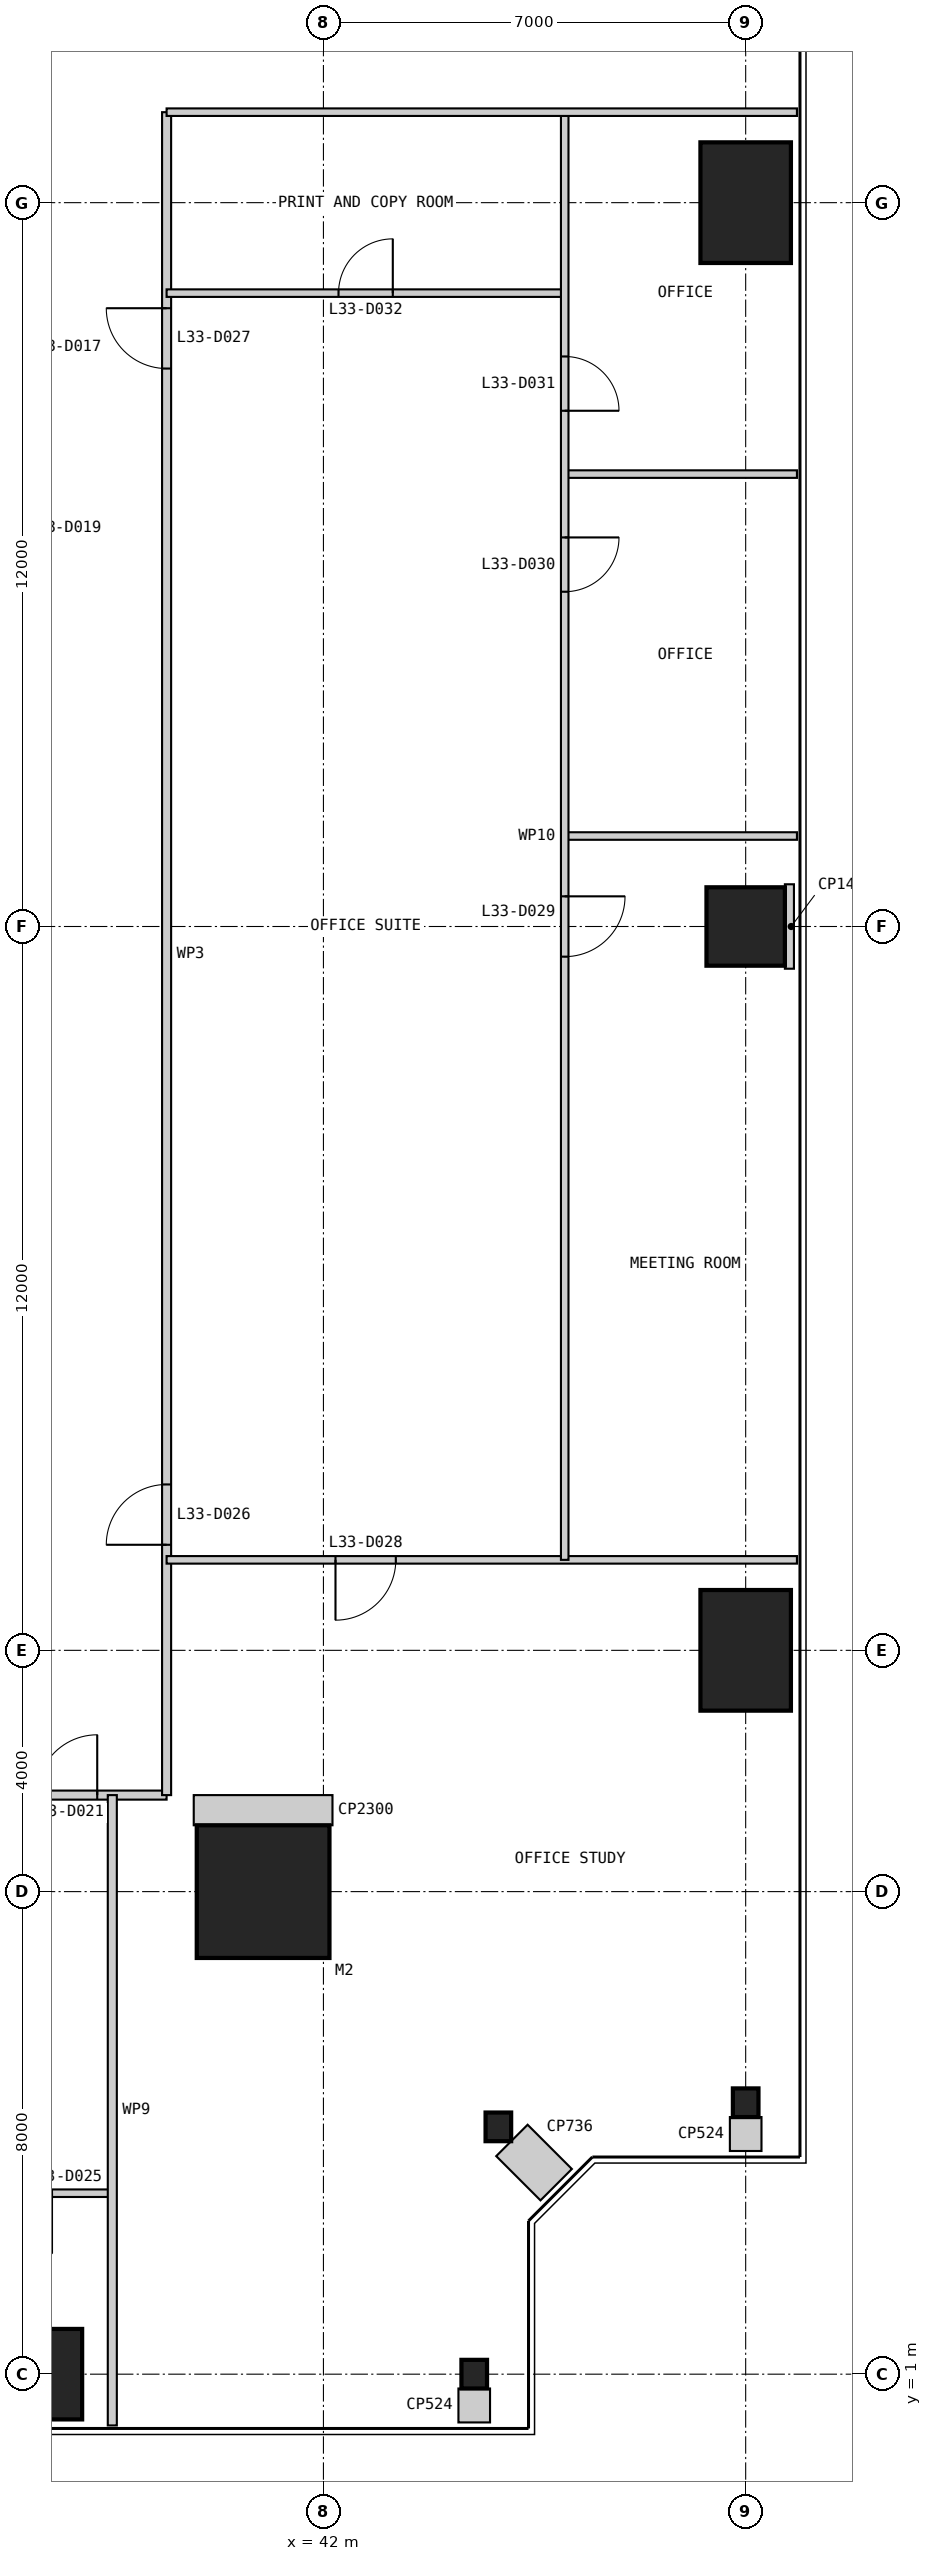
"""IFC4 building model, lengths in metres.
Left out: names, types, materials, properties, quantities, classifications, styles, units other than length and angle.
Written with IfcOpenShell. Run it as: python <this file> out.ifc"""

import sys

from ifc_helpers import new_model, si_unit, direction, frame, frame_2d, origin, origin_2d, place, context, subcontext, project, spatial, rectangle, i_section, extrude, element, fill, save


model = new_model("IFC4")
c1 = context("Model", 3, precision=1e-05, world=origin(), true_north=direction((0.0, 1.0)))
c2 = subcontext(c1, "Body", "Model", "MODEL_VIEW")
j1 = project(units=[si_unit("LENGTHUNIT", "METRE"), si_unit("PLANEANGLEUNIT", "RADIAN")], contexts=[c1])
p1 = place(None, origin())
s1 = spatial("IfcSite", under=j1, at=p1, CompositionType="ELEMENT")
p2 = place(p1, origin())
s2 = spatial("IfcBuilding", under=s1, at=p2, CompositionType="ELEMENT")
p3 = place(p2, frame((0.0, 0.0, 142.4)))
s3 = spatial("IfcBuildingStorey", under=s2, at=p3, CompositionType="ELEMENT", Elevation=142.4)
p4 = place(p3, frame((41.0, 9.0, 0.0), z_axis=(0.0, 0.0, 1.0), x_axis=(1.0, 0.0, 0.0)))
e1 = element("IfcColumn", 1, at=p4, inside=s3, PredefinedType="COLUMN", context=c2, shape_type="SweptSolid", body=[
    extrude(rectangle(XDim=2.2, YDim=2.2, at=origin_2d()), origin(), (0.0, 0.0, 1.0), 4.0),
])
p5 = place(p3, frame((37.0, 1.0, 0.0), z_axis=(0.0, 0.0, 1.0), x_axis=(1.0, 0.0, 0.0)))
e2 = element("IfcColumn", 2, at=p5, inside=s3, PredefinedType="COLUMN", context=c2, shape_type="SweptSolid", body=[
    extrude(rectangle(XDim=2.0, YDim=1.5, at=origin_2d()), origin(), (0.0, 0.0, 1.0), 4.0),
])
for number, where, z_axis, x_axis in (
    (3, (44.5, 1.0, 0.0), (0.0, 0.0, 1.0), (1.0, 0.0, 0.0)),
    (4, (44.9, 5.1, 0.0), (0.0, 0.0, 1.0), (1.0, 0.0, 0.0)),
    (5, (49.0, 5.5, 0.0), (0.0, 0.0, 1.0), (1.0, 0.0, 0.0)),
):
    element("IfcColumn", number, at=place(p3, frame(where, z_axis=z_axis, x_axis=x_axis)), inside=s3, PredefinedType="COLUMN", context=c2, shape_type="SweptSolid", body=[
        extrude(i_section(OverallWidth=0.424, OverallDepth=0.475, WebThickness=0.048, FlangeThickness=0.077, at=origin_2d()), origin(), (0.0, 0.0, 1.0), 4.0),
    ])
p6 = place(p3, frame((49.0, 13.0, 0.0), z_axis=(0.0, 0.0, 1.0), x_axis=(1.0, 0.0, 0.0)))
e6 = element("IfcColumn", 6, at=p6, inside=s3, PredefinedType="COLUMN", context=c2, shape_type="SweptSolid", body=[
    extrude(rectangle(XDim=1.5, YDim=2.0, at=origin_2d()), origin(), (0.0, 0.0, 1.0), 4.0),
])
p7 = place(p3, frame((49.0, 25.0, 0.0), z_axis=(0.0, 0.0, 1.0), x_axis=(1.0, 0.0, 0.0)))
e7 = element("IfcColumn", 7, at=p7, inside=s3, PredefinedType="COLUMN", context=c2, shape_type="SweptSolid", body=[
    extrude(rectangle(XDim=1.3, YDim=1.3, at=origin_2d()), origin(), (0.0, 0.0, 1.0), 4.0),
])
p8 = place(p3, frame((49.0, 37.0, 0.0), z_axis=(0.0, 0.0, 1.0), x_axis=(1.0, 0.0, 0.0)))
e8 = element("IfcColumn", 8, at=p8, inside=s3, PredefinedType="COLUMN", context=c2, shape_type="SweptSolid", body=[
    extrude(rectangle(XDim=1.5, YDim=2.0, at=origin_2d()), origin(), (0.0, 0.0, 1.0), 4.0),
])
p9 = place(p3, frame((10.6, 10.6, 0.0), z_axis=(0.0, 0.0, 1.0), x_axis=(1.0, 0.0, 0.0)))
e9 = element("IfcWall", 9, at=p9, inside=s3, PredefinedType="PARTITIONING", context=c2, shape_type="SweptSolid", body=[
    extrude(rectangle(XDim=28.8, YDim=0.15, at=frame_2d((14.4, 0.0))), origin(), (0.0, 0.0, 1.0), 3.85),
])
p10 = place(p9, frame((4.15, 0.0, 0.0)))
e10 = element("IfcOpeningElement", 10, at=p10, cuts=e9, PredefinedType="OPENING", context=c2, shape_type="SweptSolid", body=[
    extrude(rectangle(XDim=1.0, YDim=2.2, at=frame_2d((0.5, 1.1))), frame((0.0, 0.085, 0.0), z_axis=(0.0, -1.0, 0.0), x_axis=(1.0, 0.0, 0.0)), (0.0, 0.0, 1.0), 0.17),
])
p11 = place(p9, frame((26.65, 0.0, 0.0)))
e11 = element("IfcOpeningElement", 11, at=p11, cuts=e9, PredefinedType="OPENING", context=c2, shape_type="SweptSolid", body=[
    extrude(rectangle(XDim=1.0, YDim=2.2, at=frame_2d((0.5, 1.1))), frame((0.0, 0.085, 0.0), z_axis=(0.0, -1.0, 0.0), x_axis=(1.0, 0.0, 0.0)), (0.0, 0.0, 1.0), 0.17),
])
p12 = place(p3, frame((14.5, 4.0, 0.0), z_axis=(0.0, 0.0, 1.0), x_axis=(1.0, 0.0, 0.0)))
e12 = element("IfcWall", 12, at=p12, inside=s3, PredefinedType="PARTITIONING", context=c2, shape_type="SweptSolid", body=[
    extrude(rectangle(XDim=24.0, YDim=0.125, at=frame_2d((12.0, 0.0))), origin(), (0.0, 0.0, 1.0), 3.85),
])
p13 = place(p12, frame((4.05, 0.0, 0.0)))
e13 = element("IfcOpeningElement", 13, at=p13, cuts=e12, PredefinedType="OPENING", context=c2, shape_type="SweptSolid", body=[
    extrude(rectangle(XDim=0.9, YDim=2.2, at=frame_2d((0.45, 1.1))), frame((0.0, 0.073, 0.0), z_axis=(0.0, -1.0, 0.0), x_axis=(1.0, 0.0, 0.0)), (0.0, 0.0, 1.0), 0.145),
])
p14 = place(p12, frame((10.05, 0.0, 0.0)))
e14 = element("IfcOpeningElement", 14, at=p14, cuts=e12, PredefinedType="OPENING", context=c2, shape_type="SweptSolid", body=[
    extrude(rectangle(XDim=0.9, YDim=2.2, at=frame_2d((0.45, 1.1))), frame((0.0, 0.073, 0.0), z_axis=(0.0, -1.0, 0.0), x_axis=(1.0, 0.0, 0.0)), (0.0, 0.0, 1.0), 0.145),
])
p15 = place(p12, frame((22.0, 0.0, 0.0)))
e15 = element("IfcOpeningElement", 15, at=p15, cuts=e12, PredefinedType="OPENING", context=c2, shape_type="SweptSolid", body=[
    extrude(rectangle(XDim=1.0, YDim=2.2, at=frame_2d((0.5, 1.1))), frame((0.0, 0.073, 0.0), z_axis=(0.0, -1.0, 0.0), x_axis=(1.0, 0.0, 0.0)), (0.0, 0.0, 1.0), 0.145),
])
p16 = place(p3, frame((39.4, 10.6, 0.0), z_axis=(0.0, 0.0, 1.0), x_axis=(0.0, 1.0, 0.0)))
e16 = element("IfcWall", 16, at=p16, inside=s3, PredefinedType="PARTITIONING", context=c2, shape_type="SweptSolid", body=[
    extrude(rectangle(XDim=27.9, YDim=0.15, at=frame_2d((13.95, 0.0))), origin(), (0.0, 0.0, 1.0), 3.85),
])
p17 = place(p16, frame((4.15, 0.0, 0.0)))
e17 = element("IfcOpeningElement", 17, at=p17, cuts=e16, PredefinedType="OPENING", context=c2, shape_type="SweptSolid", body=[
    extrude(rectangle(XDim=1.0, YDim=2.2, at=frame_2d((0.5, 1.1))), frame((0.0, 0.085, 0.0), z_axis=(0.0, -1.0, 0.0), x_axis=(1.0, 0.0, 0.0)), (0.0, 0.0, 1.0), 0.17),
])
p18 = place(p16, frame((23.65, 0.0, 0.0)))
e18 = element("IfcOpeningElement", 18, at=p18, cuts=e16, PredefinedType="OPENING", context=c2, shape_type="SweptSolid", body=[
    extrude(rectangle(XDim=1.0, YDim=2.2, at=frame_2d((0.5, 1.1))), frame((0.0, 0.085, 0.0), z_axis=(0.0, -1.0, 0.0), x_axis=(1.0, 0.0, 0.0)), (0.0, 0.0, 1.0), 0.17),
])
p19 = place(p3, frame((38.5, 0.15, 0.0), z_axis=(0.0, 0.0, 1.0), x_axis=(0.0, 1.0, 0.0)))
e19 = element("IfcWall", 19, at=p19, inside=s3, PredefinedType="PARTITIONING", context=c2, shape_type="SweptSolid", body=[
    extrude(rectangle(XDim=10.45, YDim=0.15, at=frame_2d((5.225, 0.0))), origin(), (0.0, 0.0, 1.0), 3.85),
])
p20 = place(p3, frame((49.85, 14.5, 0.0), z_axis=(0.0, 0.0, 1.0), x_axis=(-1.0, 0.0, 0.0)))
e20 = element("IfcWall", 20, at=p20, inside=s3, PredefinedType="PARTITIONING", context=c2, shape_type="SweptSolid", body=[
    extrude(rectangle(XDim=10.45, YDim=0.125, at=frame_2d((5.225, 0.0))), origin(), (0.0, 0.0, 1.0), 3.85),
])
p21 = place(p20, frame((6.65, 0.0, 0.0)))
e21 = element("IfcOpeningElement", 21, at=p21, cuts=e20, PredefinedType="OPENING", context=c2, shape_type="SweptSolid", body=[
    extrude(rectangle(XDim=1.0, YDim=2.2, at=frame_2d((0.5, 1.1))), frame((0.0, 0.073, 0.0), z_axis=(0.0, -1.0, 0.0), x_axis=(1.0, 0.0, 0.0)), (0.0, 0.0, 1.0), 0.145),
])
for number, where, z_axis, x_axis in (
    (22, (49.85, 26.5, 0.0), (0.0, 0.0, 1.0), (-1.0, 0.0, 0.0)),
    (23, (49.85, 32.5, 0.0), (0.0, 0.0, 1.0), (-1.0, 0.0, 0.0)),
):
    element("IfcWall", number, at=place(p3, frame(where, z_axis=z_axis, x_axis=x_axis)), inside=s3, PredefinedType="PARTITIONING", context=c2, shape_type="SweptSolid", body=[
        extrude(rectangle(XDim=3.85, YDim=0.125, at=frame_2d((1.925, 0.0))), origin(), (0.0, 0.0, 1.0), 3.85),
    ])
p22 = place(p3, frame((46.0, 35.5, 0.0), z_axis=(0.0, 0.0, 1.0), x_axis=(-1.0, 0.0, 0.0)))
e24 = element("IfcWall", 24, at=p22, inside=s3, PredefinedType="PARTITIONING", context=c2, shape_type="SweptSolid", body=[
    extrude(rectangle(XDim=6.6, YDim=0.125, at=frame_2d((3.3, 0.0))), origin(), (0.0, 0.0, 1.0), 3.85),
])
p23 = place(p22, frame((2.85, 0.0, 0.0)))
e25 = element("IfcOpeningElement", 25, at=p23, cuts=e24, PredefinedType="OPENING", context=c2, shape_type="SweptSolid", body=[
    extrude(rectangle(XDim=0.9, YDim=2.2, at=frame_2d((0.45, 1.1))), frame((0.0, 0.073, 0.0), z_axis=(0.0, -1.0, 0.0), x_axis=(1.0, 0.0, 0.0)), (0.0, 0.0, 1.0), 0.145),
])
p24 = place(p3, frame((46.0, 14.5, 0.0), z_axis=(0.0, 0.0, 1.0), x_axis=(0.0, 1.0, 0.0)))
e26 = element("IfcWall", 26, at=p24, inside=s3, PredefinedType="PARTITIONING", context=c2, shape_type="SweptSolid", body=[
    extrude(rectangle(XDim=24.0, YDim=0.125, at=frame_2d((12.0, 0.0))), origin(), (0.0, 0.0, 1.0), 3.238),
])
p25 = place(p24, frame((10.0, 0.0, 0.0)))
e27 = element("IfcOpeningElement", 27, at=p25, cuts=e26, PredefinedType="OPENING", context=c2, shape_type="SweptSolid", body=[
    extrude(rectangle(XDim=1.0, YDim=2.2, at=frame_2d((0.5, 1.1))), frame((0.0, 0.073, 0.0), z_axis=(0.0, -1.0, 0.0), x_axis=(1.0, 0.0, 0.0)), (0.0, 0.0, 1.0), 0.145),
])
p26 = place(p24, frame((16.05, 0.0, 0.0)))
e28 = element("IfcOpeningElement", 28, at=p26, cuts=e26, PredefinedType="OPENING", context=c2, shape_type="SweptSolid", body=[
    extrude(rectangle(XDim=0.9, YDim=2.2, at=frame_2d((0.45, 1.1))), frame((0.0, 0.073, 0.0), z_axis=(0.0, -1.0, 0.0), x_axis=(1.0, 0.0, 0.0)), (0.0, 0.0, 1.0), 0.145),
])
p27 = place(p24, frame((19.05, 0.0, 0.0)))
e29 = element("IfcOpeningElement", 29, at=p27, cuts=e26, PredefinedType="OPENING", context=c2, shape_type="SweptSolid", body=[
    extrude(rectangle(XDim=0.9, YDim=2.2, at=frame_2d((0.45, 1.1))), frame((0.0, 0.073, 0.0), z_axis=(0.0, -1.0, 0.0), x_axis=(1.0, 0.0, 0.0)), (0.0, 0.0, 1.0), 0.145),
])
p28 = place(p3, frame((49.85, 38.5, 0.0), z_axis=(0.0, 0.0, 1.0), x_axis=(-1.0, 0.0, 0.0)))
e30 = element("IfcWall", 30, at=p28, inside=s3, PredefinedType="PARTITIONING", context=c2, shape_type="SweptSolid", body=[
    extrude(rectangle(XDim=10.45, YDim=0.125, at=frame_2d((5.225, 0.0))), origin(), (0.0, 0.0, 1.0), 3.85),
])
p29 = place(p3, frame((41.0, 10.6, 0.0), z_axis=(0.0, 0.0, 1.0), x_axis=(0.0, -1.0, 0.0)))
e31 = element("IfcWall", 31, at=p29, inside=s3, PredefinedType="PARTITIONING", context=c2, shape_type="SweptSolid", body=[
    extrude(rectangle(XDim=0.5, YDim=2.3, at=frame_2d((0.25, 0.0))), origin(), (0.0, 0.0, 1.0), 3.85),
])
p30 = place(p3, frame((44.5, 0.2, 0.0), z_axis=(0.0, 0.0, 1.0), x_axis=(0.0, 1.0, 0.0)))
e32 = element("IfcWall", 32, at=p30, inside=s3, PredefinedType="PARTITIONING", context=c2, shape_type="SweptSolid", body=[
    extrude(rectangle(XDim=0.562, YDim=0.524, at=frame_2d((0.281, 0.0))), origin(), (0.0, 0.0, 1.0), 3.85),
])
p31 = place(p3, frame((45.859, 4.141, 0.0), z_axis=(0.0, 0.0, 1.0), x_axis=(-0.707106781187, 0.707106781187, 0.0)))
e33 = element("IfcWall", 33, at=p31, inside=s3, PredefinedType="PARTITIONING", context=c2, shape_type="SweptSolid", body=[
    extrude(rectangle(XDim=1.038, YDim=0.736, at=frame_2d((0.519, 0.0))), origin(), (0.0, 0.0, 1.0), 3.85),
])
p32 = place(p3, frame((49.0, 4.7, 0.0), z_axis=(0.0, 0.0, 1.0), x_axis=(0.0, 1.0, 0.0)))
e34 = element("IfcWall", 34, at=p32, inside=s3, PredefinedType="PARTITIONING", context=c2, shape_type="SweptSolid", body=[
    extrude(rectangle(XDim=0.562, YDim=0.524, at=frame_2d((0.281, 0.0))), origin(), (0.0, 0.0, 1.0), 3.85),
])
p33 = place(p3, frame((49.8, 25.0, 0.0), z_axis=(0.0, 0.0, 1.0), x_axis=(-1.0, 0.0, 0.0)))
e35 = element("IfcWall", 35, at=p33, inside=s3, PredefinedType="PARTITIONING", context=c2, shape_type="SweptSolid", body=[
    extrude(rectangle(XDim=0.15, YDim=1.4, at=frame_2d((0.075, 0.0))), origin(), (0.0, 0.0, 1.0), 3.85),
])
p34 = place(p11, origin())
e36 = element("IfcDoor", 36, at=p34, inside=s3, OperationType="SINGLE_SWING_RIGHT", PredefinedType="DOOR", context=c2, shape_type="SweptSolid", body=[
    extrude(rectangle(XDim=1.0, YDim=2.2, at=frame_2d((0.5, 1.1))), frame((0.0, 0.025, 0.0), z_axis=(0.0, -1.0, 0.0), x_axis=(1.0, 0.0, 0.0)), (0.0, 0.0, 1.0), 0.05),
])
fill(e11, e36)
p35 = place(p17, origin())
e37 = element("IfcDoor", 37, at=p35, inside=s3, OperationType="SINGLE_SWING_LEFT", PredefinedType="DOOR", context=c2, shape_type="SweptSolid", body=[
    extrude(rectangle(XDim=1.0, YDim=2.2, at=frame_2d((0.5, 1.1))), frame((0.0, 0.025, 0.0), z_axis=(0.0, -1.0, 0.0), x_axis=(1.0, 0.0, 0.0)), (0.0, 0.0, 1.0), 0.05),
])
fill(e17, e37)
p36 = place(p18, origin())
e38 = element("IfcDoor", 38, at=p36, inside=s3, OperationType="SINGLE_SWING_RIGHT", PredefinedType="DOOR", context=c2, shape_type="SweptSolid", body=[
    extrude(rectangle(XDim=1.0, YDim=2.2, at=frame_2d((0.5, 1.1))), frame((0.0, 0.025, 0.0), z_axis=(0.0, -1.0, 0.0), x_axis=(1.0, 0.0, 0.0)), (0.0, 0.0, 1.0), 0.05),
])
fill(e18, e38)
p37 = place(p21, origin())
e39 = element("IfcDoor", 39, at=p37, inside=s3, OperationType="SINGLE_SWING_RIGHT", PredefinedType="DOOR", context=c2, shape_type="SweptSolid", body=[
    extrude(rectangle(XDim=1.0, YDim=2.2, at=frame_2d((0.5, 1.1))), frame((0.0, 0.025, 0.0), z_axis=(0.0, -1.0, 0.0), x_axis=(1.0, 0.0, 0.0)), (0.0, 0.0, 1.0), 0.05),
])
fill(e21, e39)
p38 = place(p25, frame((1.0, 0.0, 0.0), z_axis=(0.0, 0.0, 1.0), x_axis=(-1.0, 0.0, 0.0)))
e40 = element("IfcDoor", 40, at=p38, inside=s3, OperationType="SINGLE_SWING_LEFT", PredefinedType="DOOR", context=c2, shape_type="SweptSolid", body=[
    extrude(rectangle(XDim=1.0, YDim=2.2, at=frame_2d((0.5, 1.1))), frame((0.0, 0.025, 0.0), z_axis=(0.0, -1.0, 0.0), x_axis=(1.0, 0.0, 0.0)), (0.0, 0.0, 1.0), 0.05),
])
fill(e27, e40)
p39 = place(p26, frame((0.9, 0.0, 0.0), z_axis=(0.0, 0.0, 1.0), x_axis=(-1.0, 0.0, 0.0)))
e41 = element("IfcDoor", 41, at=p39, inside=s3, OperationType="SINGLE_SWING_LEFT", PredefinedType="DOOR", context=c2, shape_type="SweptSolid", body=[
    extrude(rectangle(XDim=0.9, YDim=2.2, at=frame_2d((0.45, 1.1))), frame((0.0, 0.025, 0.0), z_axis=(0.0, -1.0, 0.0), x_axis=(1.0, 0.0, 0.0)), (0.0, 0.0, 1.0), 0.05),
])
fill(e28, e41)
p40 = place(p27, frame((0.9, 0.0, 0.0), z_axis=(0.0, 0.0, 1.0), x_axis=(-1.0, 0.0, 0.0)))
e42 = element("IfcDoor", 42, at=p40, inside=s3, OperationType="SINGLE_SWING_RIGHT", PredefinedType="DOOR", context=c2, shape_type="SweptSolid", body=[
    extrude(rectangle(XDim=0.9, YDim=2.2, at=frame_2d((0.45, 1.1))), frame((0.0, 0.025, 0.0), z_axis=(0.0, -1.0, 0.0), x_axis=(1.0, 0.0, 0.0)), (0.0, 0.0, 1.0), 0.05),
])
fill(e29, e42)
p41 = place(p23, frame((0.9, 0.0, 0.0), z_axis=(0.0, 0.0, 1.0), x_axis=(-1.0, 0.0, 0.0)))
e43 = element("IfcDoor", 43, at=p41, inside=s3, OperationType="SINGLE_SWING_RIGHT", PredefinedType="DOOR", context=c2, shape_type="SweptSolid", body=[
    extrude(rectangle(XDim=0.9, YDim=2.2, at=frame_2d((0.45, 1.1))), frame((0.0, 0.025, 0.0), z_axis=(0.0, -1.0, 0.0), x_axis=(1.0, 0.0, 0.0)), (0.0, 0.0, 1.0), 0.05),
])
fill(e25, e43)
save(model, sys.argv[1])
